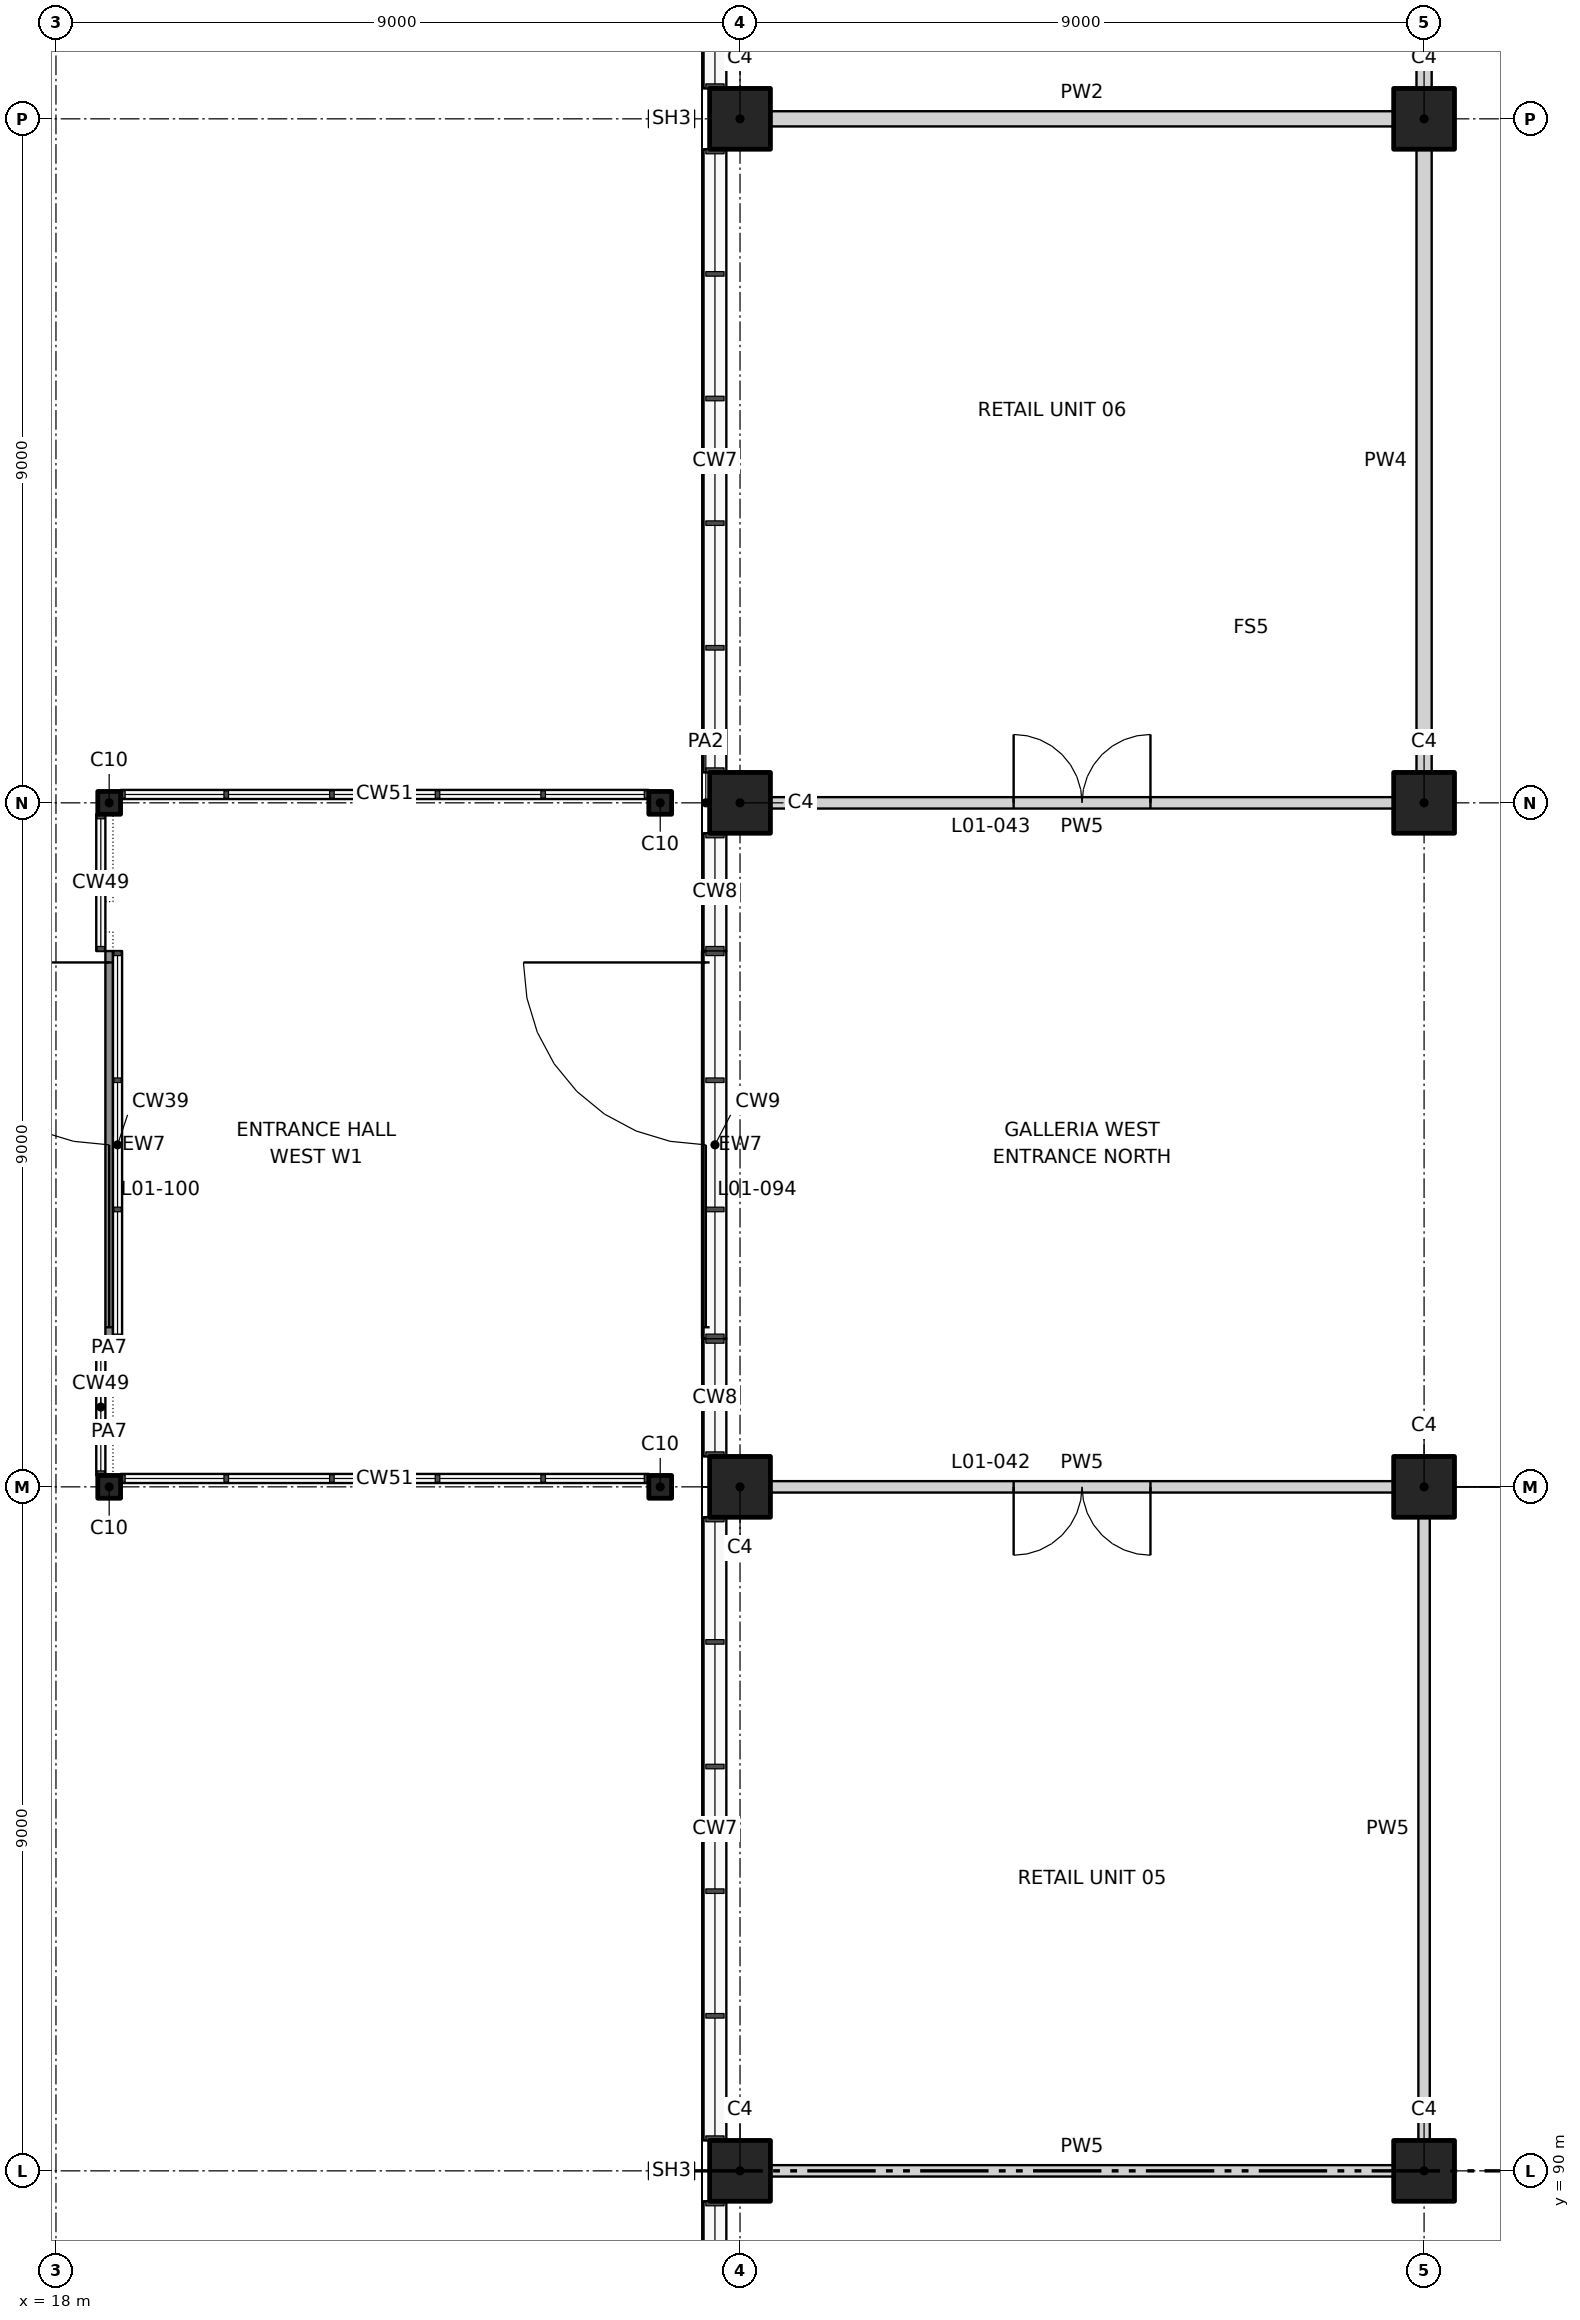
"""IFC4 building model, lengths in metres.
Left out: names, types, materials, properties, quantities, classifications, styles, units other than length and angle.
Written with IfcOpenShell. Run it as: python <this file> out.ifc"""

import sys

from ifc_helpers import new_model, si_unit, direction, frame, frame_2d, origin, origin_2d, place, context, subcontext, project, spatial, rectangle, hollow_rectangle, extrude, element, fill, save


model = new_model("IFC4")
c1 = context("Model", 3, precision=1e-05, world=origin(), true_north=direction((0.0, 1.0)))
c2 = subcontext(c1, "Body", "Model", "MODEL_VIEW")
j1 = project(units=[si_unit("LENGTHUNIT", "METRE"), si_unit("PLANEANGLEUNIT", "RADIAN")], contexts=[c1])
p1 = place(None, origin())
s1 = spatial("IfcSite", under=j1, at=p1, CompositionType="ELEMENT")
p2 = place(p1, origin())
s2 = spatial("IfcBuilding", under=s1, at=p2, CompositionType="ELEMENT")
p3 = place(p2, frame((0.0, 0.0, 7.0)))
s3 = spatial("IfcBuildingStorey", under=s2, at=p3, CompositionType="ELEMENT", Elevation=7.0)
for number, where, z_axis, x_axis in (
    (1, (27.0, 90.0, 0.0), (0.0, 0.0, 1.0), (1.0, 0.0, 0.0)),
    (2, (27.0, 99.0, 0.0), (0.0, 0.0, 1.0), (1.0, 0.0, 0.0)),
    (3, (27.0, 108.0, 0.0), (0.0, 0.0, 1.0), (1.0, 0.0, 0.0)),
    (4, (27.0, 117.0, 0.0), (0.0, 0.0, 1.0), (1.0, 0.0, 0.0)),
    (5, (36.0, 90.0, 0.0), (0.0, 0.0, 1.0), (1.0, 0.0, 0.0)),
    (6, (36.0, 99.0, 0.0), (0.0, 0.0, 1.0), (1.0, 0.0, 0.0)),
    (7, (36.0, 108.0, 0.0), (0.0, 0.0, 1.0), (1.0, 0.0, 0.0)),
    (8, (36.0, 117.0, 0.0), (0.0, 0.0, 1.0), (1.0, 0.0, 0.0)),
):
    element("IfcColumn", number, at=place(p3, frame(where, z_axis=z_axis, x_axis=x_axis)), inside=s3, PredefinedType="COLUMN", context=c2, shape_type="SweptSolid", body=[
        extrude(rectangle(XDim=0.8, YDim=0.8, at=origin_2d()), origin(), (0.0, 0.0, 1.0), 4.5),
    ])
p4 = place(p3, frame((27.4, 90.0, 0.0), z_axis=(0.0, 0.0, 1.0), x_axis=(1.0, 0.0, 0.0)))
e9 = element("IfcWall", 9, at=p4, inside=s3, PredefinedType="PARTITIONING", context=c2, shape_type="SweptSolid", body=[
    extrude(rectangle(XDim=8.2, YDim=0.15, at=frame_2d((4.1, 0.0))), origin(), (0.0, 0.0, 1.0), 3.25),
])
p5 = place(p3, frame((27.4, 99.0, 0.0), z_axis=(0.0, 0.0, 1.0), x_axis=(1.0, 0.0, 0.0)))
e10 = element("IfcWall", 10, at=p5, inside=s3, PredefinedType="PARTITIONING", context=c2, shape_type="SweptSolid", body=[
    extrude(rectangle(XDim=8.2, YDim=0.15, at=frame_2d((4.1, 0.0))), origin(), (0.0, 0.0, 1.0), 3.25),
])
p6 = place(p5, frame((3.2, 0.0, 0.0)))
e11 = element("IfcOpeningElement", 11, at=p6, cuts=e10, PredefinedType="OPENING", context=c2, shape_type="SweptSolid", body=[
    extrude(rectangle(XDim=1.8, YDim=2.1, at=frame_2d((0.9, 1.05))), frame((0.0, 0.085, 0.0), z_axis=(0.0, -1.0, 0.0), x_axis=(1.0, 0.0, 0.0)), (0.0, 0.0, 1.0), 0.17),
])
p7 = place(p3, frame((27.4, 108.0, 0.0), z_axis=(0.0, 0.0, 1.0), x_axis=(1.0, 0.0, 0.0)))
e12 = element("IfcWall", 12, at=p7, inside=s3, PredefinedType="PARTITIONING", context=c2, shape_type="SweptSolid", body=[
    extrude(rectangle(XDim=8.2, YDim=0.15, at=frame_2d((4.1, 0.0))), origin(), (0.0, 0.0, 1.0), 3.25),
])
p8 = place(p7, frame((3.2, 0.0, 0.0)))
e13 = element("IfcOpeningElement", 13, at=p8, cuts=e12, PredefinedType="OPENING", context=c2, shape_type="SweptSolid", body=[
    extrude(rectangle(XDim=1.8, YDim=2.1, at=frame_2d((0.9, 1.05))), frame((0.0, 0.085, 0.0), z_axis=(0.0, -1.0, 0.0), x_axis=(1.0, 0.0, 0.0)), (0.0, 0.0, 1.0), 0.17),
])
p9 = place(p3, frame((27.4, 117.0, 0.0), z_axis=(0.0, 0.0, 1.0), x_axis=(1.0, 0.0, 0.0)))
e14 = element("IfcWall", 14, at=p9, inside=s3, PredefinedType="PARTITIONING", context=c2, shape_type="SweptSolid", body=[
    extrude(rectangle(XDim=8.2, YDim=0.2, at=frame_2d((4.1, 0.0))), origin(), (0.0, 0.0, 1.0), 3.25),
])
p10 = place(p3, frame((36.0, 90.4, 0.0), z_axis=(0.0, 0.0, 1.0), x_axis=(0.0, 1.0, 0.0)))
e15 = element("IfcWall", 15, at=p10, inside=s3, PredefinedType="PARTITIONING", context=c2, shape_type="SweptSolid", body=[
    extrude(rectangle(XDim=8.2, YDim=0.15, at=frame_2d((4.1, 0.0))), origin(), (0.0, 0.0, 1.0), 3.25),
])
p11 = place(p3, frame((36.0, 108.4, 0.0), z_axis=(0.0, 0.0, 1.0), x_axis=(0.0, 1.0, 0.0)))
e16 = element("IfcWall", 16, at=p11, inside=s3, PredefinedType="PARTITIONING", context=c2, shape_type="SweptSolid", body=[
    extrude(rectangle(XDim=8.2, YDim=0.2, at=frame_2d((4.1, 0.0))), origin(), (0.0, 0.0, 1.0), 3.25),
])
p12 = place(p3, frame((36.0, 117.4, 0.0), z_axis=(0.0, 0.0, 1.0), x_axis=(0.0, 1.0, 0.0)))
e17 = element("IfcWall", 17, at=p12, inside=s3, PredefinedType="PARTITIONING", context=c2, shape_type="SweptSolid", body=[
    extrude(rectangle(XDim=8.6, YDim=0.2, at=frame_2d((4.3, 0.0))), origin(), (0.0, 0.0, 1.0), 3.25),
])
p13 = place(p12, frame((3.4, 0.0, 0.0)))
e18 = element("IfcOpeningElement", 18, at=p13, cuts=e17, PredefinedType="OPENING", context=c2, shape_type="SweptSolid", body=[
    extrude(rectangle(XDim=1.8, YDim=2.1, at=frame_2d((0.9, 1.05))), frame((0.0, 0.11, 0.0), z_axis=(0.0, -1.0, 0.0), x_axis=(1.0, 0.0, 0.0)), (0.0, 0.0, 1.0), 0.22),
])
p14 = place(p3, frame((26.55, 106.05, 0.0), z_axis=(0.0, 0.0, 1.0), x_axis=(0.0, -1.0, 0.0)))
e19 = element("IfcWall", 19, at=p14, inside=s3, PredefinedType="SOLIDWALL", context=c2, shape_type="SweptSolid", body=[
    extrude(rectangle(XDim=5.1, YDim=0.1, at=frame_2d((2.55, 0.0))), origin(), (0.0, 0.0, 1.0), 3.1),
])
p15 = place(p14, frame((0.15, 0.0, 0.0)))
e20 = element("IfcOpeningElement", 20, at=p15, cuts=e19, PredefinedType="OPENING", context=c2, shape_type="SweptSolid", body=[
    extrude(rectangle(XDim=4.8, YDim=2.7, at=frame_2d((2.4, 1.35))), frame((0.0, 0.06, 0.0), z_axis=(0.0, -1.0, 0.0), x_axis=(1.0, 0.0, 0.0)), (0.0, 0.0, 1.0), 0.12),
])
for number, where, z_axis, x_axis in (
    (21, (18.7, 99.0, 0.0), (0.0, 0.0, 1.0), (1.0, 0.0, 0.0)),
    (22, (25.95, 99.0, 0.0), (0.0, 0.0, 1.0), (1.0, 0.0, 0.0)),
    (23, (18.7, 108.0, 0.0), (0.0, 0.0, 1.0), (1.0, 0.0, 0.0)),
    (24, (25.95, 108.0, 0.0), (0.0, 0.0, 1.0), (1.0, 0.0, 0.0)),
):
    element("IfcColumn", number, at=place(p3, frame(where, z_axis=z_axis, x_axis=x_axis)), inside=s3, PredefinedType="COLUMN", context=c2, shape_type="SweptSolid", body=[
        extrude(hollow_rectangle(XDim=0.3, YDim=0.3, WallThickness=0.012, at=origin_2d()), origin(), (0.0, 0.0, 1.0), 4.5),
    ])
p16 = place(p3, frame((18.7, 106.05, 0.0), z_axis=(0.0, 0.0, 1.0), x_axis=(0.0, -1.0, 0.0)))
e25 = element("IfcWall", 25, at=p16, inside=s3, PredefinedType="SOLIDWALL", context=c2, shape_type="SweptSolid", body=[
    extrude(rectangle(XDim=5.1, YDim=0.1, at=frame_2d((2.55, 0.0))), origin(), (0.0, 0.0, 1.0), 3.1),
])
p17 = place(p16, frame((0.15, 0.0, 0.0)))
e26 = element("IfcOpeningElement", 26, at=p17, cuts=e25, PredefinedType="OPENING", context=c2, shape_type="SweptSolid", body=[
    extrude(rectangle(XDim=4.8, YDim=2.7, at=frame_2d((2.4, 1.35))), frame((0.0, 0.06, 0.0), z_axis=(0.0, -1.0, 0.0), x_axis=(1.0, 0.0, 0.0)), (0.0, 0.0, 1.0), 0.12),
])
p18 = place(p6, frame((1.8, 0.0, 0.0), z_axis=(0.0, 0.0, 1.0), x_axis=(-1.0, 0.0, 0.0)))
e27 = element("IfcDoor", 27, at=p18, inside=s3, OperationType="DOUBLE_DOOR_DOUBLE_SWING", PredefinedType="DOOR", context=c2, shape_type="SweptSolid", body=[
    extrude(rectangle(XDim=1.8, YDim=2.1, at=frame_2d((0.9, 1.05))), frame((0.0, 0.025, 0.0), z_axis=(0.0, -1.0, 0.0), x_axis=(1.0, 0.0, 0.0)), (0.0, 0.0, 1.0), 0.05),
])
fill(e11, e27)
p19 = place(p8, origin())
e28 = element("IfcDoor", 28, at=p19, inside=s3, OperationType="DOUBLE_DOOR_DOUBLE_SWING", PredefinedType="DOOR", context=c2, shape_type="SweptSolid", body=[
    extrude(rectangle(XDim=1.8, YDim=2.1, at=frame_2d((0.9, 1.05))), frame((0.0, 0.025, 0.0), z_axis=(0.0, -1.0, 0.0), x_axis=(1.0, 0.0, 0.0)), (0.0, 0.0, 1.0), 0.05),
])
fill(e13, e28)
p20 = place(p15, frame((4.8, 0.0, 0.0), z_axis=(0.0, 0.0, 1.0), x_axis=(-1.0, 0.0, 0.0)))
e29 = element("IfcDoor", 29, at=p20, inside=s3, OperationType="DOUBLE_DOOR_SINGLE_SWING", PredefinedType="DOOR", context=c2, shape_type="SweptSolid", body=[
    extrude(rectangle(XDim=4.8, YDim=2.7, at=frame_2d((2.4, 1.35))), frame((0.0, 0.025, 0.0), z_axis=(0.0, -1.0, 0.0), x_axis=(1.0, 0.0, 0.0)), (0.0, 0.0, 1.0), 0.05),
])
fill(e20, e29)
p21 = place(p17, frame((4.8, 0.0, 0.0), z_axis=(0.0, 0.0, 1.0), x_axis=(-1.0, 0.0, 0.0)))
e30 = element("IfcDoor", 30, at=p21, inside=s3, OperationType="DOUBLE_DOOR_SINGLE_SWING", PredefinedType="DOOR", context=c2, shape_type="SweptSolid", body=[
    extrude(rectangle(XDim=4.8, YDim=2.7, at=frame_2d((2.4, 1.35))), frame((0.0, 0.025, 0.0), z_axis=(0.0, -1.0, 0.0), x_axis=(1.0, 0.0, 0.0)), (0.0, 0.0, 1.0), 0.05),
])
fill(e26, e30)
save(model, sys.argv[1])
